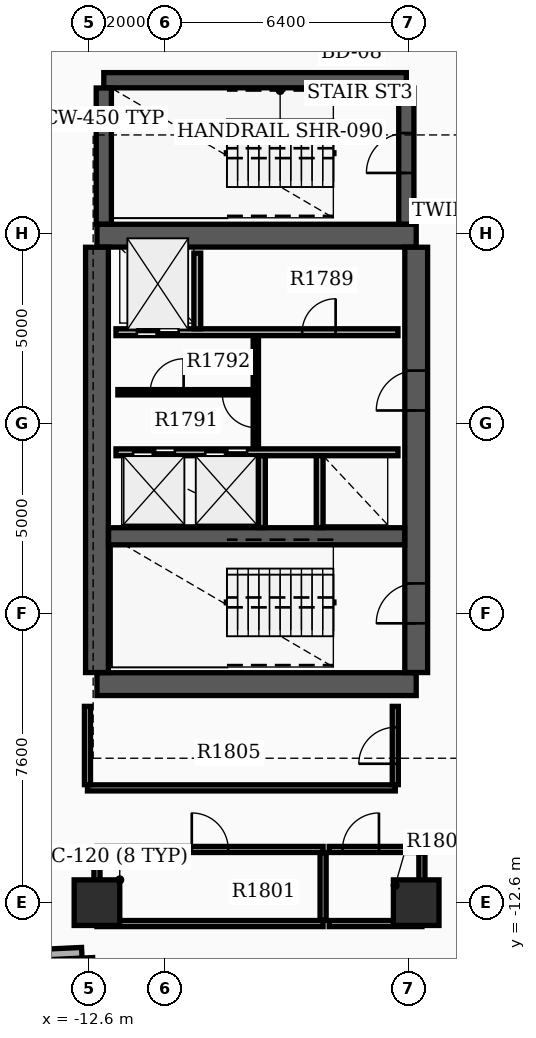
"""IFC4 building model, lengths in metres.
Left out: names, types, materials, properties, quantities, classifications, styles, units other than length and angle.
Written with IfcOpenShell. Run it as: python <this file> out.ifc"""

import sys

from ifc_helpers import new_model, si_unit, direction, frame, frame_2d, origin, origin_2d, place, context, subcontext, project, spatial, rectangle, extrude, element, fill, save


model = new_model("IFC4")
c1 = context("Model", 3, precision=1e-05, world=origin(), true_north=direction((0.0, 1.0)))
c2 = subcontext(c1, "Body", "Model", "MODEL_VIEW")
j1 = project(units=[si_unit("LENGTHUNIT", "METRE"), si_unit("PLANEANGLEUNIT", "RADIAN")], contexts=[c1])
p1 = place(None, origin())
s1 = spatial("IfcSite", under=j1, at=p1, CompositionType="ELEMENT")
p2 = place(p1, origin())
s2 = spatial("IfcBuilding", under=s1, at=p2, CompositionType="ELEMENT")
p3 = place(p2, frame((0.0, 0.0, 116.4)))
s3 = spatial("IfcBuildingStorey", under=s2, at=p3, CompositionType="ELEMENT", Elevation=116.4)
for number, where, z_axis, x_axis in (
    (1, (-12.4, -6.85, 0.0), (0.0, 0.0, 1.0), (1.0, 0.0, 0.0)),
    (2, (-12.4, 4.95, 0.0), (0.0, 0.0, 1.0), (1.0, 0.0, 0.0)),
):
    element("IfcWall", number, at=place(p3, frame(where, z_axis=z_axis, x_axis=x_axis)), inside=s3, PredefinedType="SHEAR", context=c2, shape_type="SweptSolid", body=[
        extrude(rectangle(XDim=8.4, YDim=0.6, at=frame_2d((4.2, 0.0))), origin(), (0.0, 0.0, 1.0), 3.7),
    ])
p4 = place(p3, frame((-12.4, -6.545, 0.0), z_axis=(0.0, 0.0, 1.0), x_axis=(0.0, 1.0, 0.0)))
e3 = element("IfcWall", 3, at=p4, inside=s3, PredefinedType="SHEAR", context=c2, shape_type="SweptSolid", body=[
    extrude(rectangle(XDim=11.19, YDim=0.6, at=frame_2d((5.595, 0.0))), origin(), (0.0, 0.0, 1.0), 3.7),
])
p5 = place(p3, frame((-4.0, -6.545, 0.0), z_axis=(0.0, 0.0, 1.0), x_axis=(0.0, 1.0, 0.0)))
e4 = element("IfcWall", 4, at=p5, inside=s3, PredefinedType="SHEAR", context=c2, shape_type="SweptSolid", body=[
    extrude(rectangle(XDim=11.19, YDim=0.6, at=frame_2d((5.595, 0.0))), origin(), (0.0, 0.0, 1.0), 3.7),
])
p6 = place(p5, frame((1.295, 0.0, 0.0)))
e5 = element("IfcOpeningElement", 5, at=p6, cuts=e4, PredefinedType="OPENING", context=c2, shape_type="SweptSolid", body=[
    extrude(rectangle(XDim=1.05, YDim=2.15, at=frame_2d((0.525, 1.075))), frame((0.0, 0.31, 0.0), z_axis=(0.0, -1.0, 0.0), x_axis=(1.0, 0.0, 0.0)), (0.0, 0.0, 1.0), 0.62),
])
p7 = place(p5, frame((6.895, 0.0, 0.0)))
e6 = element("IfcOpeningElement", 6, at=p7, cuts=e4, PredefinedType="OPENING", context=c2, shape_type="SweptSolid", body=[
    extrude(rectangle(XDim=1.05, YDim=2.15, at=frame_2d((0.525, 1.075))), frame((0.0, 0.31, 0.0), z_axis=(0.0, -1.0, 0.0), x_axis=(1.0, 0.0, 0.0)), (0.0, 0.0, 1.0), 0.62),
])
p8 = place(p3, frame((-12.095, -2.96, 0.0), z_axis=(0.0, 0.0, 1.0), x_axis=(1.0, 0.0, 0.0)))
e7 = element("IfcWall", 7, at=p8, inside=s3, PredefinedType="SHEAR", context=c2, shape_type="SweptSolid", body=[
    extrude(rectangle(XDim=7.79, YDim=0.45, at=frame_2d((3.895, 0.0))), origin(), (0.0, 0.0, 1.0), 3.7),
])
p9 = place(p3, frame((-12.22, 9.04, 0.0), z_axis=(0.0, 0.0, 1.0), x_axis=(1.0, 0.0, 0.0)))
e8 = element("IfcWall", 8, at=p9, inside=s3, PredefinedType="SHEAR", context=c2, shape_type="SweptSolid", body=[
    extrude(rectangle(XDim=7.96, YDim=0.4, at=frame_2d((3.98, 0.0))), origin(), (0.0, 0.0, 1.0), 3.7),
])
p10 = place(p3, frame((-12.22, 5.255, 0.0), z_axis=(0.0, 0.0, 1.0), x_axis=(0.0, 1.0, 0.0)))
e9 = element("IfcWall", 9, at=p10, inside=s3, PredefinedType="SHEAR", context=c2, shape_type="SweptSolid", body=[
    extrude(rectangle(XDim=3.58, YDim=0.4, at=frame_2d((1.79, 0.0))), origin(), (0.0, 0.0, 1.0), 3.7),
])
p11 = place(p3, frame((-4.26, 5.255, 0.0), z_axis=(0.0, 0.0, 1.0), x_axis=(0.0, 1.0, 0.0)))
e10 = element("IfcWall", 10, at=p11, inside=s3, PredefinedType="SHEAR", context=c2, shape_type="SweptSolid", body=[
    extrude(rectangle(XDim=3.58, YDim=0.4, at=frame_2d((1.79, 0.0))), origin(), (0.0, 0.0, 1.0), 3.7),
])
p12 = place(p11, frame((1.345, 0.0, 0.0)))
e11 = element("IfcOpeningElement", 11, at=p12, cuts=e10, PredefinedType="OPENING", context=c2, shape_type="SweptSolid", body=[
    extrude(rectangle(XDim=1.05, YDim=2.15, at=frame_2d((0.525, 1.075))), frame((0.0, 0.21, 0.0), z_axis=(0.0, -1.0, 0.0), x_axis=(1.0, 0.0, 0.0)), (0.0, 0.0, 1.0), 0.42),
])
for number, where, z_axis, x_axis in (
    (12, (-12.4, -12.6, 0.0), (0.0, 0.0, 1.0), (1.0, 0.0, 0.0)),
    (13, (-4.0, -12.6, 0.0), (0.0, 0.0, 1.0), (1.0, 0.0, 0.0)),
):
    element("IfcColumn", number, at=place(p3, frame(where, z_axis=z_axis, x_axis=x_axis)), inside=s3, PredefinedType="COLUMN", context=c2, shape_type="SweptSolid", body=[
        extrude(rectangle(XDim=1.2, YDim=1.2, at=origin_2d()), origin(), (0.0, 0.0, 1.0), 3.9),
    ])
p13 = place(p3, frame((-14.017, -13.976, 0.0), z_axis=(0.0, 0.0, 1.0), x_axis=(0.998883930236, 0.047232339719, 0.0)))
e14 = element("IfcWall", 14, at=p13, inside=s3, PredefinedType="STANDARD", context=c2, shape_type="SweptSolid", body=[
    extrude(rectangle(XDim=1.22, YDim=0.28, at=frame_2d((0.61, 0.0))), origin(), (0.0, 0.0, 1.0), 2.97),
])
p14 = place(p3, frame((-12.652, -14.052, 0.0), z_axis=(0.0, 0.0, 1.0), x_axis=(0.047039284441, -0.99889304018, 0.0)))
e15 = element("IfcWall", 15, at=p14, inside=s3, PredefinedType="STANDARD", context=c2, shape_type="SweptSolid", body=[
    extrude(rectangle(XDim=1.5, YDim=0.28, at=frame_2d((0.75, 0.0))), origin(), (0.0, 0.0, 1.0), 2.97),
])
p15 = place(p3, frame((-11.9, 2.41, 0.0), z_axis=(0.0, 0.0, 1.0), x_axis=(1.0, 0.0, 0.0)))
e16 = element("IfcWall", 16, at=p15, inside=s3, PredefinedType="SOLIDWALL", context=c2, shape_type="SweptSolid", body=[
    extrude(rectangle(XDim=7.42, YDim=0.18, at=frame_2d((3.71, 0.0))), origin(), (0.0, 0.0, 1.0), 2.96),
])
p16 = place(p15, frame((0.55, 0.0, 0.0)))
e17 = element("IfcOpeningElement", 17, at=p16, cuts=e16, PredefinedType="OPENING", context=c2, shape_type="SweptSolid", body=[
    extrude(rectangle(XDim=1.1, YDim=2.15, at=frame_2d((0.55, 1.075))), frame((0.0, 0.1, 0.0), z_axis=(0.0, -1.0, 0.0), x_axis=(1.0, 0.0, 0.0)), (0.0, 0.0, 1.0), 0.2),
])
p17 = place(p15, frame((4.9, 0.0, 0.0)))
e18 = element("IfcOpeningElement", 18, at=p17, cuts=e16, PredefinedType="OPENING", context=c2, shape_type="SweptSolid", body=[
    extrude(rectangle(XDim=0.88, YDim=2.1, at=frame_2d((0.44, 1.05))), frame((0.0, 0.1, 0.0), z_axis=(0.0, -1.0, 0.0), x_axis=(1.0, 0.0, 0.0)), (0.0, 0.0, 1.0), 0.2),
])
p18 = place(p3, frame((-11.9, -0.75, 0.0), z_axis=(0.0, 0.0, 1.0), x_axis=(1.0, 0.0, 0.0)))
e19 = element("IfcWall", 19, at=p18, inside=s3, PredefinedType="SOLIDWALL", context=c2, shape_type="SweptSolid", body=[
    extrude(rectangle(XDim=7.42, YDim=0.18, at=frame_2d((3.71, 0.0))), origin(), (0.0, 0.0, 1.0), 2.96),
])
p19 = place(p18, frame((0.45, 0.0, 0.0)))
e20 = element("IfcOpeningElement", 20, at=p19, cuts=e19, PredefinedType="OPENING", context=c2, shape_type="SweptSolid", body=[
    extrude(rectangle(XDim=1.1, YDim=2.15, at=frame_2d((0.55, 1.075))), frame((0.0, 0.1, 0.0), z_axis=(0.0, -1.0, 0.0), x_axis=(1.0, 0.0, 0.0)), (0.0, 0.0, 1.0), 0.2),
])
p20 = place(p18, frame((2.35, 0.0, 0.0)))
e21 = element("IfcOpeningElement", 21, at=p20, cuts=e19, PredefinedType="OPENING", context=c2, shape_type="SweptSolid", body=[
    extrude(rectangle(XDim=1.1, YDim=2.15, at=frame_2d((0.55, 1.075))), frame((0.0, 0.1, 0.0), z_axis=(0.0, -1.0, 0.0), x_axis=(1.0, 0.0, 0.0)), (0.0, 0.0, 1.0), 0.2),
])
p21 = place(p3, frame((-9.76, 2.5, 0.0), z_axis=(0.0, 0.0, 1.0), x_axis=(0.0, 1.0, 0.0)))
e22 = element("IfcWall", 22, at=p21, inside=s3, PredefinedType="SOLIDWALL", context=c2, shape_type="SweptSolid", body=[
    extrude(rectangle(XDim=1.99, YDim=0.18, at=frame_2d((0.995, 0.0))), origin(), (0.0, 0.0, 1.0), 2.96),
])
for number, where, z_axis, x_axis in (
    (23, (-8.06, -2.73, 0.0), (0.0, 0.0, 1.0), (0.0, 1.0, 0.0)),
    (24, (-6.54, -2.73, 0.0), (0.0, 0.0, 1.0), (0.0, 1.0, 0.0)),
):
    element("IfcWall", number, at=place(p3, frame(where, z_axis=z_axis, x_axis=x_axis)), inside=s3, PredefinedType="SOLIDWALL", context=c2, shape_type="SweptSolid", body=[
        extrude(rectangle(XDim=1.89, YDim=0.18, at=frame_2d((0.945, 0.0))), origin(), (0.0, 0.0, 1.0), 2.96),
    ])
p22 = place(p3, frame((-8.22, -0.65, 0.0), z_axis=(0.0, 0.0, 1.0), x_axis=(0.0, 1.0, 0.0)))
e25 = element("IfcWall", 25, at=p22, inside=s3, PredefinedType="SOLIDWALL", context=c2, shape_type="SweptSolid", body=[
    extrude(rectangle(XDim=2.96, YDim=0.14, at=frame_2d((1.48, 0.0))), origin(), (0.0, 0.0, 1.0), 2.96),
])
p23 = place(p22, frame((0.55, 0.0, 0.0)))
e26 = element("IfcOpeningElement", 26, at=p23, cuts=e25, PredefinedType="OPENING", context=c2, shape_type="SweptSolid", body=[
    extrude(rectangle(XDim=0.88, YDim=2.1, at=frame_2d((0.44, 1.05))), frame((0.0, 0.08, 0.0), z_axis=(0.0, -1.0, 0.0), x_axis=(1.0, 0.0, 0.0)), (0.0, 0.0, 1.0), 0.16),
])
p24 = place(p3, frame((-11.85, 0.83, 0.0), z_axis=(0.0, 0.0, 1.0), x_axis=(1.0, 0.0, 0.0)))
e27 = element("IfcWall", 27, at=p24, inside=s3, PredefinedType="PARTITIONING", context=c2, shape_type="SweptSolid", body=[
    extrude(rectangle(XDim=3.552, YDim=0.14, at=frame_2d((1.776, 0.0))), origin(), (0.0, 0.0, 1.0), 2.96),
])
p25 = place(p24, frame((0.85, 0.0, 0.0)))
e28 = element("IfcOpeningElement", 28, at=p25, cuts=e27, PredefinedType="OPENING", context=c2, shape_type="SweptSolid", body=[
    extrude(rectangle(XDim=0.88, YDim=2.1, at=frame_2d((0.44, 1.05))), frame((0.0, 0.08, 0.0), z_axis=(0.0, -1.0, 0.0), x_axis=(1.0, 0.0, 0.0)), (0.0, 0.0, 1.0), 0.16),
])
p26 = place(p3, frame((-12.4, -13.15, 0.0), z_axis=(0.0, 0.0, 1.0), x_axis=(1.0, 0.0, 0.0)))
e29 = element("IfcWall", 29, at=p26, inside=s3, PredefinedType="PARTITIONING", context=c2, shape_type="SweptSolid", body=[
    extrude(rectangle(XDim=5.95, YDim=0.16, at=frame_2d((2.975, 0.0))), origin(), (0.0, 0.0, 1.0), 2.96),
])
p27 = place(p3, frame((-12.4, -11.2, 0.0), z_axis=(0.0, 0.0, 1.0), x_axis=(1.0, 0.0, 0.0)))
e30 = element("IfcWall", 30, at=p27, inside=s3, PredefinedType="PARTITIONING", context=c2, shape_type="SweptSolid", body=[
    extrude(rectangle(XDim=5.95, YDim=0.16, at=frame_2d((2.975, 0.0))), origin(), (0.0, 0.0, 1.0), 2.96),
])
p28 = place(p27, frame((2.495, 0.0, 0.0)))
e31 = element("IfcOpeningElement", 31, at=p28, cuts=e30, PredefinedType="OPENING", context=c2, shape_type="SweptSolid", body=[
    extrude(rectangle(XDim=0.96, YDim=2.15, at=frame_2d((0.48, 1.075))), frame((0.0, 0.09, 0.0), z_axis=(0.0, -1.0, 0.0), x_axis=(1.0, 0.0, 0.0)), (0.0, 0.0, 1.0), 0.18),
])
for number, where, z_axis, x_axis in (
    (32, (-12.4, -13.065, 0.0), (0.0, 0.0, 1.0), (0.0, 1.0, 0.0)),
    (33, (-6.45, -13.065, 0.0), (0.0, 0.0, 1.0), (0.0, 1.0, 0.0)),
):
    element("IfcWall", number, at=place(p3, frame(where, z_axis=z_axis, x_axis=x_axis)), inside=s3, PredefinedType="PARTITIONING", context=c2, shape_type="SweptSolid", body=[
        extrude(rectangle(XDim=1.78, YDim=0.16, at=frame_2d((0.89, 0.0))), origin(), (0.0, 0.0, 1.0), 2.96),
    ])
p29 = place(p3, frame((-6.29, -13.15, 0.0), z_axis=(0.0, 0.0, 1.0), x_axis=(1.0, 0.0, 0.0)))
e34 = element("IfcWall", 34, at=p29, inside=s3, PredefinedType="PARTITIONING", context=c2, shape_type="SweptSolid", body=[
    extrude(rectangle(XDim=2.44, YDim=0.16, at=frame_2d((1.22, 0.0))), origin(), (0.0, 0.0, 1.0), 2.96),
])
p30 = place(p3, frame((-6.29, -11.2, 0.0), z_axis=(0.0, 0.0, 1.0), x_axis=(1.0, 0.0, 0.0)))
e35 = element("IfcWall", 35, at=p30, inside=s3, PredefinedType="PARTITIONING", context=c2, shape_type="SweptSolid", body=[
    extrude(rectangle(XDim=2.44, YDim=0.16, at=frame_2d((1.22, 0.0))), origin(), (0.0, 0.0, 1.0), 2.96),
])
p31 = place(p30, frame((0.35, 0.0, 0.0)))
e36 = element("IfcOpeningElement", 36, at=p31, cuts=e35, PredefinedType="OPENING", context=c2, shape_type="SweptSolid", body=[
    extrude(rectangle(XDim=0.96, YDim=2.15, at=frame_2d((0.48, 1.075))), frame((0.0, 0.09, 0.0), z_axis=(0.0, -1.0, 0.0), x_axis=(1.0, 0.0, 0.0)), (0.0, 0.0, 1.0), 0.18),
])
p32 = place(p3, frame((-3.85, -13.065, 0.0), z_axis=(0.0, 0.0, 1.0), x_axis=(0.0, 1.0, 0.0)))
e37 = element("IfcWall", 37, at=p32, inside=s3, PredefinedType="PARTITIONING", context=c2, shape_type="SweptSolid", body=[
    extrude(rectangle(XDim=1.78, YDim=0.16, at=frame_2d((0.89, 0.0))), origin(), (0.0, 0.0, 1.0), 2.96),
])
p33 = place(p3, frame((-12.65, -9.58, 0.0), z_axis=(0.0, 0.0, 1.0), x_axis=(1.0, 0.0, 0.0)))
e38 = element("IfcWall", 38, at=p33, inside=s3, PredefinedType="PARTITIONING", context=c2, shape_type="SweptSolid", body=[
    extrude(rectangle(XDim=8.1, YDim=0.16, at=frame_2d((4.05, 0.0))), origin(), (0.0, 0.0, 1.0), 2.96),
])
p34 = place(p3, frame((-12.65, -9.495, 0.0), z_axis=(0.0, 0.0, 1.0), x_axis=(0.0, 1.0, 0.0)))
e39 = element("IfcWall", 39, at=p34, inside=s3, PredefinedType="PARTITIONING", context=c2, shape_type="SweptSolid", body=[
    extrude(rectangle(XDim=2.06, YDim=0.16, at=frame_2d((1.03, 0.0))), origin(), (0.0, 0.0, 1.0), 2.96),
])
p35 = place(p3, frame((-4.55, -9.495, 0.0), z_axis=(0.0, 0.0, 1.0), x_axis=(0.0, 1.0, 0.0)))
e40 = element("IfcWall", 40, at=p35, inside=s3, PredefinedType="PARTITIONING", context=c2, shape_type="SweptSolid", body=[
    extrude(rectangle(XDim=2.06, YDim=0.16, at=frame_2d((1.03, 0.0))), origin(), (0.0, 0.0, 1.0), 2.96),
])
p36 = place(p35, frame((0.55, 0.0, 0.0)))
e41 = element("IfcOpeningElement", 41, at=p36, cuts=e40, PredefinedType="OPENING", context=c2, shape_type="SweptSolid", body=[
    extrude(rectangle(XDim=0.96, YDim=2.15, at=frame_2d((0.48, 1.075))), frame((0.0, 0.09, 0.0), z_axis=(0.0, -1.0, 0.0), x_axis=(1.0, 0.0, 0.0)), (0.0, 0.0, 1.0), 0.18),
])
p37 = place(p6, origin())
e42 = element("IfcDoor", 42, at=p37, inside=s3, OperationType="SINGLE_SWING_LEFT", PredefinedType="DOOR", context=c2, shape_type="SweptSolid", body=[
    extrude(rectangle(XDim=1.05, YDim=2.15, at=frame_2d((0.525, 1.075))), frame((0.0, 0.025, 0.0), z_axis=(0.0, -1.0, 0.0), x_axis=(1.0, 0.0, 0.0)), (0.0, 0.0, 1.0), 0.05),
])
fill(e5, e42)
p38 = place(p7, origin())
e43 = element("IfcDoor", 43, at=p38, inside=s3, OperationType="SINGLE_SWING_LEFT", PredefinedType="DOOR", context=c2, shape_type="SweptSolid", body=[
    extrude(rectangle(XDim=1.05, YDim=2.15, at=frame_2d((0.525, 1.075))), frame((0.0, 0.025, 0.0), z_axis=(0.0, -1.0, 0.0), x_axis=(1.0, 0.0, 0.0)), (0.0, 0.0, 1.0), 0.05),
])
fill(e6, e43)
p39 = place(p12, origin())
e44 = element("IfcDoor", 44, at=p39, inside=s3, OperationType="SINGLE_SWING_LEFT", PredefinedType="DOOR", context=c2, shape_type="SweptSolid", body=[
    extrude(rectangle(XDim=1.05, YDim=2.15, at=frame_2d((0.525, 1.075))), frame((0.0, 0.025, 0.0), z_axis=(0.0, -1.0, 0.0), x_axis=(1.0, 0.0, 0.0)), (0.0, 0.0, 1.0), 0.05),
])
fill(e11, e44)
p40 = place(p16, origin())
e45 = element("IfcDoor", 45, at=p40, inside=s3, OperationType="DOUBLE_DOOR_SLIDING", PredefinedType="DOOR", context=c2, shape_type="SweptSolid", body=[
    extrude(rectangle(XDim=1.1, YDim=2.15, at=frame_2d((0.55, 1.075))), frame((0.0, 0.025, 0.0), z_axis=(0.0, -1.0, 0.0), x_axis=(1.0, 0.0, 0.0)), (0.0, 0.0, 1.0), 0.05),
])
fill(e17, e45)
p41 = place(p19, origin())
e46 = element("IfcDoor", 46, at=p41, inside=s3, OperationType="DOUBLE_DOOR_SLIDING", PredefinedType="DOOR", context=c2, shape_type="SweptSolid", body=[
    extrude(rectangle(XDim=1.1, YDim=2.15, at=frame_2d((0.55, 1.075))), frame((0.0, 0.025, 0.0), z_axis=(0.0, -1.0, 0.0), x_axis=(1.0, 0.0, 0.0)), (0.0, 0.0, 1.0), 0.05),
])
fill(e20, e46)
p42 = place(p20, origin())
e47 = element("IfcDoor", 47, at=p42, inside=s3, OperationType="DOUBLE_DOOR_SLIDING", PredefinedType="DOOR", context=c2, shape_type="SweptSolid", body=[
    extrude(rectangle(XDim=1.1, YDim=2.15, at=frame_2d((0.55, 1.075))), frame((0.0, 0.025, 0.0), z_axis=(0.0, -1.0, 0.0), x_axis=(1.0, 0.0, 0.0)), (0.0, 0.0, 1.0), 0.05),
])
fill(e21, e47)
p43 = place(p17, origin())
e48 = element("IfcDoor", 48, at=p43, inside=s3, OperationType="SINGLE_SWING_RIGHT", PredefinedType="DOOR", context=c2, shape_type="SweptSolid", body=[
    extrude(rectangle(XDim=0.88, YDim=2.1, at=frame_2d((0.44, 1.05))), frame((0.0, 0.025, 0.0), z_axis=(0.0, -1.0, 0.0), x_axis=(1.0, 0.0, 0.0)), (0.0, 0.0, 1.0), 0.05),
])
fill(e18, e48)
p44 = place(p23, origin())
e49 = element("IfcDoor", 49, at=p44, inside=s3, OperationType="SINGLE_SWING_RIGHT", PredefinedType="DOOR", context=c2, shape_type="SweptSolid", body=[
    extrude(rectangle(XDim=0.88, YDim=2.1, at=frame_2d((0.44, 1.05))), frame((0.0, 0.025, 0.0), z_axis=(0.0, -1.0, 0.0), x_axis=(1.0, 0.0, 0.0)), (0.0, 0.0, 1.0), 0.05),
])
fill(e26, e49)
p45 = place(p25, origin())
e50 = element("IfcDoor", 50, at=p45, inside=s3, OperationType="SINGLE_SWING_RIGHT", PredefinedType="DOOR", context=c2, shape_type="SweptSolid", body=[
    extrude(rectangle(XDim=0.88, YDim=2.1, at=frame_2d((0.44, 1.05))), frame((0.0, 0.025, 0.0), z_axis=(0.0, -1.0, 0.0), x_axis=(1.0, 0.0, 0.0)), (0.0, 0.0, 1.0), 0.05),
])
fill(e28, e50)
p46 = place(p28, origin())
e51 = element("IfcDoor", 51, at=p46, inside=s3, OperationType="SINGLE_SWING_LEFT", PredefinedType="DOOR", context=c2, shape_type="SweptSolid", body=[
    extrude(rectangle(XDim=0.96, YDim=2.15, at=frame_2d((0.48, 1.075))), frame((0.0, 0.025, 0.0), z_axis=(0.0, -1.0, 0.0), x_axis=(1.0, 0.0, 0.0)), (0.0, 0.0, 1.0), 0.05),
])
fill(e31, e51)
p47 = place(p31, origin())
e52 = element("IfcDoor", 52, at=p47, inside=s3, OperationType="SINGLE_SWING_RIGHT", PredefinedType="DOOR", context=c2, shape_type="SweptSolid", body=[
    extrude(rectangle(XDim=0.96, YDim=2.15, at=frame_2d((0.48, 1.075))), frame((0.0, 0.025, 0.0), z_axis=(0.0, -1.0, 0.0), x_axis=(1.0, 0.0, 0.0)), (0.0, 0.0, 1.0), 0.05),
])
fill(e36, e52)
p48 = place(p36, origin())
e53 = element("IfcDoor", 53, at=p48, inside=s3, OperationType="SINGLE_SWING_LEFT", PredefinedType="DOOR", context=c2, shape_type="SweptSolid", body=[
    extrude(rectangle(XDim=0.96, YDim=2.15, at=frame_2d((0.48, 1.075))), frame((0.0, 0.025, 0.0), z_axis=(0.0, -1.0, 0.0), x_axis=(1.0, 0.0, 0.0)), (0.0, 0.0, 1.0), 0.05),
])
fill(e41, e53)
save(model, sys.argv[1])
